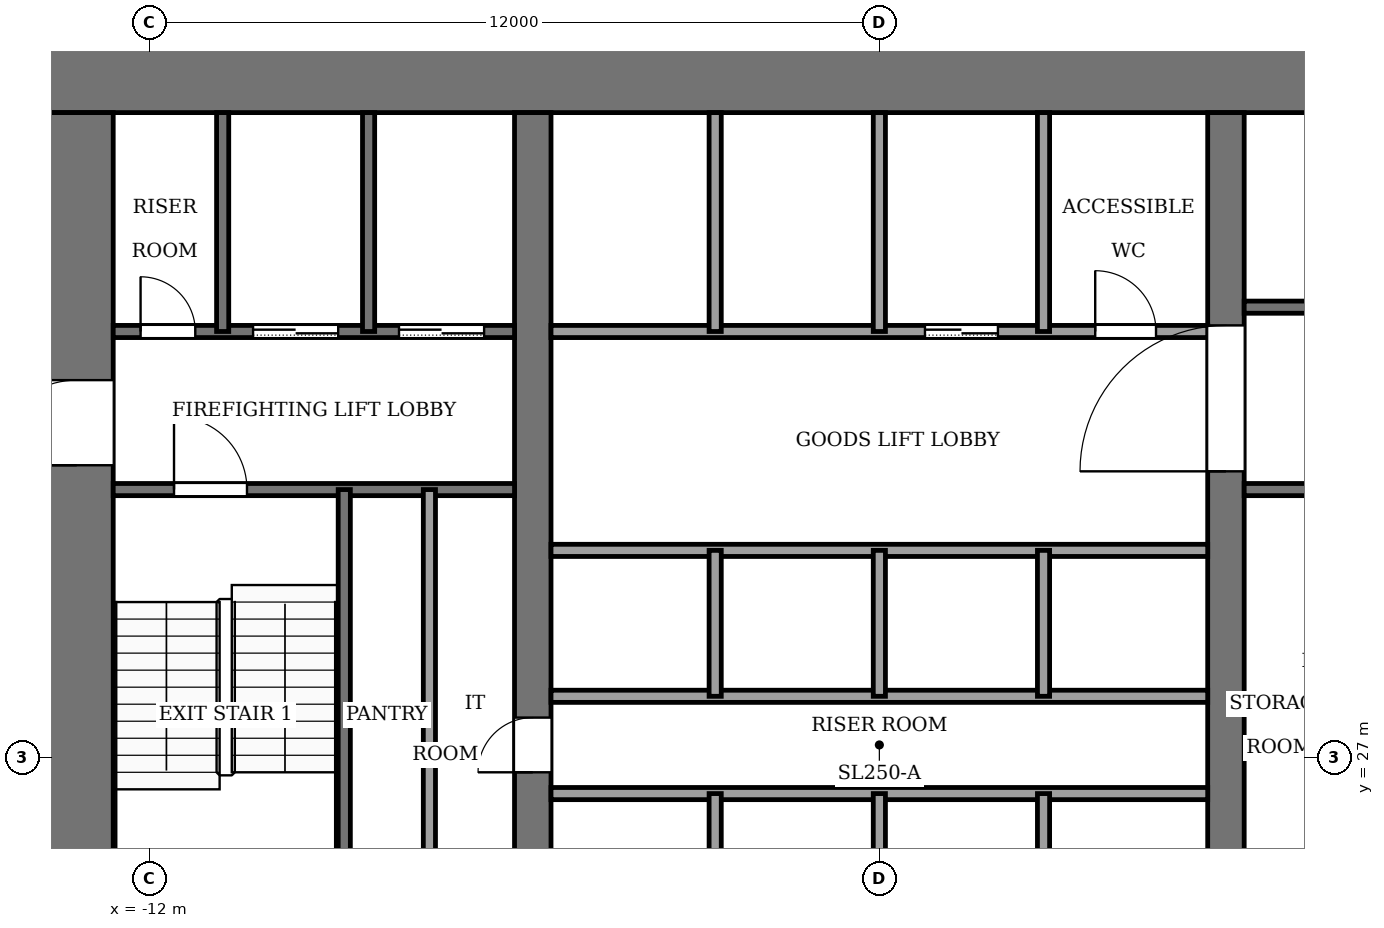
"""IFC4 building model, lengths in metres.
Left out: names, types, materials, properties, quantities, classifications, styles, units other than length and angle.
Written with IfcOpenShell. Run it as: python <this file> out.ifc"""

import sys

from ifc_helpers import new_model, si_unit, direction, frame, frame_2d, origin, place, context, subcontext, project, spatial, rectangle, extrude, element, fill, save


model = new_model("IFC4")
c1 = context("Model", 3, precision=1e-05, world=origin(), true_north=direction((0.0, 1.0)))
c2 = subcontext(c1, "Body", "Model", "MODEL_VIEW")
j1 = project(units=[si_unit("LENGTHUNIT", "METRE"), si_unit("PLANEANGLEUNIT", "RADIAN")], contexts=[c1])
p1 = place(None, origin())
s1 = spatial("IfcSite", under=j1, at=p1, CompositionType="ELEMENT")
p2 = place(p1, origin())
s2 = spatial("IfcBuilding", under=s1, at=p2, CompositionType="ELEMENT")
p3 = place(p2, frame((0.0, 0.0, 98.0)))
s3 = spatial("IfcBuildingStorey", under=s2, at=p3, CompositionType="ELEMENT", Elevation=98.0)
p4 = place(p3, frame((-13.8, 38.2, -0.13), z_axis=(0.0, 0.0, 1.0), x_axis=(1.0, 0.0, 0.0)))
e1 = element("IfcWall", 1, at=p4, inside=s3, PredefinedType="SHEAR", context=c2, shape_type="SweptSolid", body=[
    extrude(rectangle(XDim=27.6, YDim=1.2, at=frame_2d((13.8, 0.0))), origin(), (0.0, 0.0, 1.0), 4.0),
])
p5 = place(p3, frame((-13.2, 18.4, -0.13), z_axis=(0.0, 0.0, 1.0), x_axis=(0.0, 1.0, 0.0)))
e2 = element("IfcWall", 2, at=p5, inside=s3, PredefinedType="SHEAR", context=c2, shape_type="SweptSolid", body=[
    extrude(rectangle(XDim=19.2, YDim=1.2, at=frame_2d((9.6, 0.0))), origin(), (0.0, 0.0, 1.0), 4.0),
])
p6 = place(p5, frame((2.8, 0.0, 0.13)))
e3 = element("IfcOpeningElement", 3, at=p6, cuts=e2, PredefinedType="OPENING", context=c2, shape_type="SweptSolid", body=[
    extrude(rectangle(XDim=2.4, YDim=2.4, at=frame_2d((1.2, 1.2))), frame((0.0, 0.61, 0.0), z_axis=(0.0, -1.0, 0.0), x_axis=(1.0, 0.0, 0.0)), (0.0, 0.0, 1.0), 1.22),
])
p7 = place(p5, frame((13.4, 0.0, 0.13)))
e4 = element("IfcOpeningElement", 4, at=p7, cuts=e2, PredefinedType="OPENING", context=c2, shape_type="SweptSolid", body=[
    extrude(rectangle(XDim=1.4, YDim=2.2, at=frame_2d((0.7, 1.1))), frame((0.0, 0.61, 0.0), z_axis=(0.0, -1.0, 0.0), x_axis=(1.0, 0.0, 0.0)), (0.0, 0.0, 1.0), 1.22),
])
p8 = place(p3, frame((-5.7, 18.4, -0.13), z_axis=(0.0, 0.0, 1.0), x_axis=(0.0, 1.0, 0.0)))
e5 = element("IfcWall", 5, at=p8, inside=s3, PredefinedType="SHEAR", context=c2, shape_type="SweptSolid", body=[
    extrude(rectangle(XDim=19.2, YDim=0.6, at=frame_2d((9.6, 0.0))), origin(), (0.0, 0.0, 1.0), 4.0),
])
p9 = place(p8, frame((8.35, 0.0, 0.13)))
e6 = element("IfcOpeningElement", 6, at=p9, cuts=e5, PredefinedType="OPENING", context=c2, shape_type="SweptSolid", body=[
    extrude(rectangle(XDim=0.9, YDim=2.1, at=frame_2d((0.45, 1.05))), frame((0.0, 0.31, 0.0), z_axis=(0.0, -1.0, 0.0), x_axis=(1.0, 0.0, 0.0)), (0.0, 0.0, 1.0), 0.62),
])
p10 = place(p3, frame((5.7, 18.4, -0.13), z_axis=(0.0, 0.0, 1.0), x_axis=(0.0, 1.0, 0.0)))
e7 = element("IfcWall", 7, at=p10, inside=s3, PredefinedType="SHEAR", context=c2, shape_type="SweptSolid", body=[
    extrude(rectangle(XDim=19.2, YDim=0.6, at=frame_2d((9.6, 0.0))), origin(), (0.0, 0.0, 1.0), 4.0),
])
p11 = place(p10, frame((13.3, 0.0, 0.13)))
e8 = element("IfcOpeningElement", 8, at=p11, cuts=e7, PredefinedType="OPENING", context=c2, shape_type="SweptSolid", body=[
    extrude(rectangle(XDim=2.4, YDim=2.4, at=frame_2d((1.2, 1.2))), frame((0.0, 0.31, 0.0), z_axis=(0.0, -1.0, 0.0), x_axis=(1.0, 0.0, 0.0)), (0.0, 0.0, 1.0), 0.62),
])
for number, where, z_axis, x_axis in (
    (9, (-5.4, 26.4, 0.0), (0.0, 0.0, 1.0), (1.0, 0.0, 0.0)),
    (10, (-5.4, 28.0, 0.0), (0.0, 0.0, 1.0), (1.0, 0.0, 0.0)),
    (11, (-5.4, 30.4, 0.0), (0.0, 0.0, 1.0), (1.0, 0.0, 0.0)),
):
    element("IfcWall", number, at=place(p3, frame(where, z_axis=z_axis, x_axis=x_axis)), inside=s3, PredefinedType="PARTITIONING", context=c2, shape_type="SweptSolid", body=[
        extrude(rectangle(XDim=10.8, YDim=0.2, at=frame_2d((5.4, 0.0))), origin(), (0.0, 0.0, 1.0), 3.87),
    ])
p12 = place(p3, frame((-12.6, 31.4, 0.0), z_axis=(0.0, 0.0, 1.0), x_axis=(1.0, 0.0, 0.0)))
e12 = element("IfcWall", 12, at=p12, inside=s3, PredefinedType="PARTITIONING", context=c2, shape_type="SweptSolid", body=[
    extrude(rectangle(XDim=6.6, YDim=0.2, at=frame_2d((3.3, 0.0))), origin(), (0.0, 0.0, 1.0), 3.87),
])
p13 = place(p12, frame((1.0, 0.0, 0.0)))
e13 = element("IfcOpeningElement", 13, at=p13, cuts=e12, PredefinedType="OPENING", context=c2, shape_type="SweptSolid", body=[
    extrude(rectangle(XDim=1.2, YDim=2.2, at=frame_2d((0.6, 1.1))), frame((0.0, 0.11, 0.0), z_axis=(0.0, -1.0, 0.0), x_axis=(1.0, 0.0, 0.0)), (0.0, 0.0, 1.0), 0.22),
])
p14 = place(p3, frame((6.0, 31.4, 0.0), z_axis=(0.0, 0.0, 1.0), x_axis=(1.0, 0.0, 0.0)))
e14 = element("IfcWall", 14, at=p14, inside=s3, PredefinedType="PARTITIONING", context=c2, shape_type="SweptSolid", body=[
    extrude(rectangle(XDim=6.6, YDim=0.2, at=frame_2d((3.3, 0.0))), origin(), (0.0, 0.0, 1.0), 3.87),
])
p15 = place(p3, frame((-12.6, 34.0, 0.0), z_axis=(0.0, 0.0, 1.0), x_axis=(1.0, 0.0, 0.0)))
e15 = element("IfcWall", 15, at=p15, inside=s3, PredefinedType="PARTITIONING", context=c2, shape_type="SweptSolid", body=[
    extrude(rectangle(XDim=6.6, YDim=0.2, at=frame_2d((3.3, 0.0))), origin(), (0.0, 0.0, 1.0), 3.87),
])
p16 = place(p15, frame((4.7, 0.0, 0.0)))
e16 = element("IfcOpeningElement", 16, at=p16, cuts=e15, PredefinedType="OPENING", context=c2, shape_type="SweptSolid", body=[
    extrude(rectangle(XDim=1.4, YDim=2.2, at=frame_2d((0.7, 1.1))), frame((0.0, 0.11, 0.0), z_axis=(0.0, -1.0, 0.0), x_axis=(1.0, 0.0, 0.0)), (0.0, 0.0, 1.0), 0.22),
])
p17 = place(p15, frame((2.3, 0.0, 0.0)))
e17 = element("IfcOpeningElement", 17, at=p17, cuts=e15, PredefinedType="OPENING", context=c2, shape_type="SweptSolid", body=[
    extrude(rectangle(XDim=1.4, YDim=2.2, at=frame_2d((0.7, 1.1))), frame((0.0, 0.11, 0.0), z_axis=(0.0, -1.0, 0.0), x_axis=(1.0, 0.0, 0.0)), (0.0, 0.0, 1.0), 0.22),
])
p18 = place(p15, frame((0.45, 0.0, 0.0)))
e18 = element("IfcOpeningElement", 18, at=p18, cuts=e15, PredefinedType="OPENING", context=c2, shape_type="SweptSolid", body=[
    extrude(rectangle(XDim=0.9, YDim=2.1, at=frame_2d((0.45, 1.05))), frame((0.0, 0.11, 0.0), z_axis=(0.0, -1.0, 0.0), x_axis=(1.0, 0.0, 0.0)), (0.0, 0.0, 1.0), 0.22),
])
p19 = place(p3, frame((-5.4, 34.0, 0.0), z_axis=(0.0, 0.0, 1.0), x_axis=(1.0, 0.0, 0.0)))
e19 = element("IfcWall", 19, at=p19, inside=s3, PredefinedType="PARTITIONING", context=c2, shape_type="SweptSolid", body=[
    extrude(rectangle(XDim=10.8, YDim=0.2, at=frame_2d((5.4, 0.0))), origin(), (0.0, 0.0, 1.0), 3.87),
])
p20 = place(p19, frame((6.15, 0.0, 0.0)))
e20 = element("IfcOpeningElement", 20, at=p20, cuts=e19, PredefinedType="OPENING", context=c2, shape_type="SweptSolid", body=[
    extrude(rectangle(XDim=1.2, YDim=2.2, at=frame_2d((0.6, 1.1))), frame((0.0, 0.11, 0.0), z_axis=(0.0, -1.0, 0.0), x_axis=(1.0, 0.0, 0.0)), (0.0, 0.0, 1.0), 0.22),
])
p21 = place(p19, frame((8.95, 0.0, 0.0)))
e21 = element("IfcOpeningElement", 21, at=p21, cuts=e19, PredefinedType="OPENING", context=c2, shape_type="SweptSolid", body=[
    extrude(rectangle(XDim=1.0, YDim=2.1, at=frame_2d((0.5, 1.05))), frame((0.0, 0.11, 0.0), z_axis=(0.0, -1.0, 0.0), x_axis=(1.0, 0.0, 0.0)), (0.0, 0.0, 1.0), 0.22),
])
p22 = place(p3, frame((6.0, 34.4, 0.0), z_axis=(0.0, 0.0, 1.0), x_axis=(1.0, 0.0, 0.0)))
e22 = element("IfcWall", 22, at=p22, inside=s3, PredefinedType="PARTITIONING", context=c2, shape_type="SweptSolid", body=[
    extrude(rectangle(XDim=6.6, YDim=0.2, at=frame_2d((3.3, 0.0))), origin(), (0.0, 0.0, 1.0), 3.87),
])
p23 = place(p22, frame((4.8, 0.0, 0.0)))
e23 = element("IfcOpeningElement", 23, at=p23, cuts=e22, PredefinedType="OPENING", context=c2, shape_type="SweptSolid", body=[
    extrude(rectangle(XDim=1.2, YDim=2.2, at=frame_2d((0.6, 1.1))), frame((0.0, 0.11, 0.0), z_axis=(0.0, -1.0, 0.0), x_axis=(1.0, 0.0, 0.0)), (0.0, 0.0, 1.0), 0.22),
])
p24 = place(p3, frame((-10.8, 34.0, 0.0), z_axis=(0.0, 0.0, 1.0), x_axis=(0.0, 1.0, 0.0)))
e24 = element("IfcWall", 24, at=p24, inside=s3, PredefinedType="PARTITIONING", context=c2, shape_type="SweptSolid", body=[
    extrude(rectangle(XDim=3.6, YDim=0.2, at=frame_2d((1.8, 0.0))), origin(), (0.0, 0.0, 1.0), 3.87),
])
p25 = place(p3, frame((-8.8, 24.0, 0.0), z_axis=(0.0, 0.0, 1.0), x_axis=(0.0, 1.0, 0.0)))
e25 = element("IfcWall", 25, at=p25, inside=s3, PredefinedType="PARTITIONING", context=c2, shape_type="SweptSolid", body=[
    extrude(rectangle(XDim=7.4, YDim=0.2, at=frame_2d((3.7, 0.0))), origin(), (0.0, 0.0, 1.0), 3.87),
])
p26 = place(p3, frame((-8.4, 34.0, 0.0), z_axis=(0.0, 0.0, 1.0), x_axis=(0.0, 1.0, 0.0)))
e26 = element("IfcWall", 26, at=p26, inside=s3, PredefinedType="PARTITIONING", context=c2, shape_type="SweptSolid", body=[
    extrude(rectangle(XDim=3.6, YDim=0.2, at=frame_2d((1.8, 0.0))), origin(), (0.0, 0.0, 1.0), 3.87),
])
p27 = place(p3, frame((-7.4, 24.0, 0.0), z_axis=(0.0, 0.0, 1.0), x_axis=(0.0, 1.0, 0.0)))
e27 = element("IfcWall", 27, at=p27, inside=s3, PredefinedType="PARTITIONING", context=c2, shape_type="SweptSolid", body=[
    extrude(rectangle(XDim=7.4, YDim=0.2, at=frame_2d((3.7, 0.0))), origin(), (0.0, 0.0, 1.0), 3.87),
])
for number, where, z_axis, x_axis in (
    (28, (-2.7, 24.0, 0.0), (0.0, 0.0, 1.0), (0.0, 1.0, 0.0)),
    (29, (-2.7, 28.0, 0.0), (0.0, 0.0, 1.0), (0.0, 1.0, 0.0)),
):
    element("IfcWall", number, at=place(p3, frame(where, z_axis=z_axis, x_axis=x_axis)), inside=s3, PredefinedType="PARTITIONING", context=c2, shape_type="SweptSolid", body=[
        extrude(rectangle(XDim=2.4, YDim=0.2, at=frame_2d((1.2, 0.0))), origin(), (0.0, 0.0, 1.0), 3.87),
    ])
p28 = place(p3, frame((-2.7, 34.0, 0.0), z_axis=(0.0, 0.0, 1.0), x_axis=(0.0, 1.0, 0.0)))
e30 = element("IfcWall", 30, at=p28, inside=s3, PredefinedType="PARTITIONING", context=c2, shape_type="SweptSolid", body=[
    extrude(rectangle(XDim=3.6, YDim=0.2, at=frame_2d((1.8, 0.0))), origin(), (0.0, 0.0, 1.0), 3.87),
])
for number, where, z_axis, x_axis in (
    (31, (0.0, 24.0, 0.0), (0.0, 0.0, 1.0), (0.0, 1.0, 0.0)),
    (32, (0.0, 28.0, 0.0), (0.0, 0.0, 1.0), (0.0, 1.0, 0.0)),
):
    element("IfcWall", number, at=place(p3, frame(where, z_axis=z_axis, x_axis=x_axis)), inside=s3, PredefinedType="PARTITIONING", context=c2, shape_type="SweptSolid", body=[
        extrude(rectangle(XDim=2.4, YDim=0.2, at=frame_2d((1.2, 0.0))), origin(), (0.0, 0.0, 1.0), 3.87),
    ])
p29 = place(p3, frame((0.0, 34.0, 0.0), z_axis=(0.0, 0.0, 1.0), x_axis=(0.0, 1.0, 0.0)))
e33 = element("IfcWall", 33, at=p29, inside=s3, PredefinedType="PARTITIONING", context=c2, shape_type="SweptSolid", body=[
    extrude(rectangle(XDim=3.6, YDim=0.2, at=frame_2d((1.8, 0.0))), origin(), (0.0, 0.0, 1.0), 3.87),
])
for number, where, z_axis, x_axis in (
    (34, (2.7, 24.0, 0.0), (0.0, 0.0, 1.0), (0.0, 1.0, 0.0)),
    (35, (2.7, 28.0, 0.0), (0.0, 0.0, 1.0), (0.0, 1.0, 0.0)),
):
    element("IfcWall", number, at=place(p3, frame(where, z_axis=z_axis, x_axis=x_axis)), inside=s3, PredefinedType="PARTITIONING", context=c2, shape_type="SweptSolid", body=[
        extrude(rectangle(XDim=2.4, YDim=0.2, at=frame_2d((1.2, 0.0))), origin(), (0.0, 0.0, 1.0), 3.87),
    ])
p30 = place(p3, frame((2.7, 34.0, 0.0), z_axis=(0.0, 0.0, 1.0), x_axis=(0.0, 1.0, 0.0)))
e36 = element("IfcWall", 36, at=p30, inside=s3, PredefinedType="PARTITIONING", context=c2, shape_type="SweptSolid", body=[
    extrude(rectangle(XDim=3.6, YDim=0.2, at=frame_2d((1.8, 0.0))), origin(), (0.0, 0.0, 1.0), 3.87),
])
p31 = place(p20, origin())
e37 = element("IfcDoor", 37, at=p31, inside=s3, OperationType="SLIDING_TO_LEFT", PredefinedType="DOOR", context=c2, shape_type="SweptSolid", body=[
    extrude(rectangle(XDim=1.2, YDim=2.2, at=frame_2d((0.6, 1.1))), frame((0.0, 0.025, 0.0), z_axis=(0.0, -1.0, 0.0), x_axis=(1.0, 0.0, 0.0)), (0.0, 0.0, 1.0), 0.05),
])
fill(e20, e37)
p32 = place(p16, origin())
e38 = element("IfcDoor", 38, at=p32, inside=s3, OperationType="SLIDING_TO_LEFT", PredefinedType="DOOR", context=c2, shape_type="SweptSolid", body=[
    extrude(rectangle(XDim=1.4, YDim=2.2, at=frame_2d((0.7, 1.1))), frame((0.0, 0.025, 0.0), z_axis=(0.0, -1.0, 0.0), x_axis=(1.0, 0.0, 0.0)), (0.0, 0.0, 1.0), 0.05),
])
fill(e16, e38)
p33 = place(p17, origin())
e39 = element("IfcDoor", 39, at=p33, inside=s3, OperationType="SLIDING_TO_LEFT", PredefinedType="DOOR", context=c2, shape_type="SweptSolid", body=[
    extrude(rectangle(XDim=1.4, YDim=2.2, at=frame_2d((0.7, 1.1))), frame((0.0, 0.025, 0.0), z_axis=(0.0, -1.0, 0.0), x_axis=(1.0, 0.0, 0.0)), (0.0, 0.0, 1.0), 0.05),
])
fill(e17, e39)
p34 = place(p18, origin())
e40 = element("IfcDoor", 40, at=p34, inside=s3, OperationType="SINGLE_SWING_RIGHT", PredefinedType="DOOR", context=c2, shape_type="SweptSolid", body=[
    extrude(rectangle(XDim=0.9, YDim=2.1, at=frame_2d((0.45, 1.05))), frame((0.0, 0.025, 0.0), z_axis=(0.0, -1.0, 0.0), x_axis=(1.0, 0.0, 0.0)), (0.0, 0.0, 1.0), 0.05),
])
fill(e18, e40)
p35 = place(p21, origin())
e41 = element("IfcDoor", 41, at=p35, inside=s3, OperationType="SINGLE_SWING_LEFT", PredefinedType="DOOR", context=c2, shape_type="SweptSolid", body=[
    extrude(rectangle(XDim=1.0, YDim=2.1, at=frame_2d((0.5, 1.05))), frame((0.0, 0.025, 0.0), z_axis=(0.0, -1.0, 0.0), x_axis=(1.0, 0.0, 0.0)), (0.0, 0.0, 1.0), 0.05),
])
fill(e21, e41)
p36 = place(p9, origin())
e42 = element("IfcDoor", 42, at=p36, inside=s3, OperationType="SINGLE_SWING_RIGHT", PredefinedType="DOOR", context=c2, shape_type="SweptSolid", body=[
    extrude(rectangle(XDim=0.9, YDim=2.1, at=frame_2d((0.45, 1.05))), frame((0.0, 0.025, 0.0), z_axis=(0.0, -1.0, 0.0), x_axis=(1.0, 0.0, 0.0)), (0.0, 0.0, 1.0), 0.05),
])
fill(e6, e42)
p37 = place(p13, origin())
e43 = element("IfcDoor", 43, at=p37, inside=s3, OperationType="SINGLE_SWING_RIGHT", PredefinedType="DOOR", context=c2, shape_type="SweptSolid", body=[
    extrude(rectangle(XDim=1.2, YDim=2.2, at=frame_2d((0.6, 1.1))), frame((0.0, 0.025, 0.0), z_axis=(0.0, -1.0, 0.0), x_axis=(1.0, 0.0, 0.0)), (0.0, 0.0, 1.0), 0.05),
])
fill(e13, e43)
p38 = place(p11, origin())
e44 = element("IfcDoor", 44, at=p38, inside=s3, OperationType="DOUBLE_DOOR_SINGLE_SWING", PredefinedType="DOOR", context=c2, shape_type="SweptSolid", body=[
    extrude(rectangle(XDim=2.4, YDim=2.4, at=frame_2d((1.2, 1.2))), frame((0.0, 0.025, 0.0), z_axis=(0.0, -1.0, 0.0), x_axis=(1.0, 0.0, 0.0)), (0.0, 0.0, 1.0), 0.05),
])
fill(e8, e44)
p39 = place(p7, origin())
e45 = element("IfcDoor", 45, at=p39, inside=s3, OperationType="SINGLE_SWING_RIGHT", PredefinedType="DOOR", context=c2, shape_type="SweptSolid", body=[
    extrude(rectangle(XDim=1.4, YDim=2.2, at=frame_2d((0.7, 1.1))), frame((0.0, 0.025, 0.0), z_axis=(0.0, -1.0, 0.0), x_axis=(1.0, 0.0, 0.0)), (0.0, 0.0, 1.0), 0.05),
])
fill(e4, e45)
save(model, sys.argv[1])
